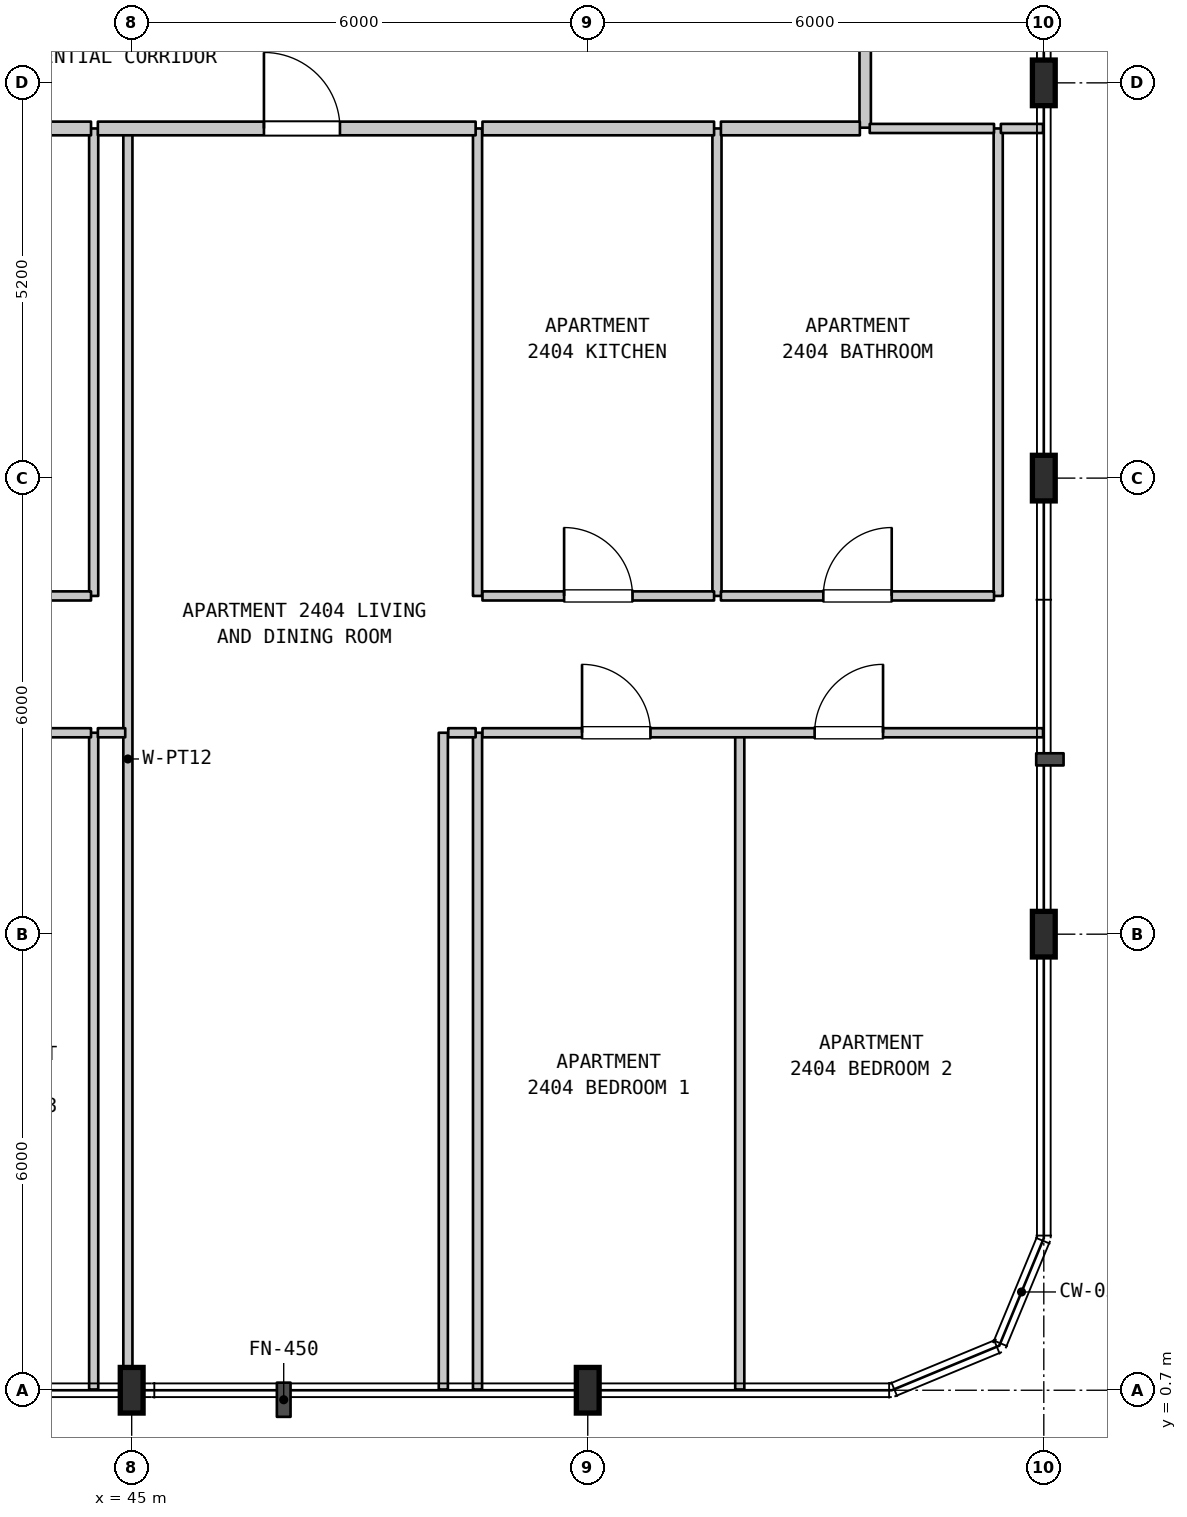
"""IFC4 building model, lengths in metres.
Left out: names, types, materials, properties, quantities, classifications, styles, units other than length and angle.
Written with IfcOpenShell. Run it as: python <this file> out.ifc"""

import sys

from ifc_helpers import new_model, si_unit, direction, frame, frame_2d, origin, origin_2d, place, context, subcontext, project, spatial, rectangle, i_section, extrude, element, fill, save


model = new_model("IFC4")
c1 = context("Model", 3, precision=1e-05, world=origin(), true_north=direction((0.0, 1.0)))
c2 = subcontext(c1, "Body", "Model", "MODEL_VIEW")
j1 = project(units=[si_unit("LENGTHUNIT", "METRE"), si_unit("PLANEANGLEUNIT", "RADIAN")], contexts=[c1])
p1 = place(None, origin())
s1 = spatial("IfcSite", under=j1, at=p1, CompositionType="ELEMENT")
p2 = place(p1, origin())
s2 = spatial("IfcBuilding", under=s1, at=p2, CompositionType="ELEMENT")
p3 = place(p2, frame((0.0, 0.0, 102.0)))
s3 = spatial("IfcBuildingStorey", under=s2, at=p3, CompositionType="ELEMENT", Elevation=102.0)
for number, where, z_axis, x_axis in (
    (1, (45.0, 0.7, 0.0), (0.0, 0.0, 1.0), (1.0, 0.0, 0.0)),
    (2, (51.0, 0.7, 0.0), (0.0, 0.0, 1.0), (1.0, 0.0, 0.0)),
    (3, (57.0, 6.7, 0.0), (0.0, 0.0, 1.0), (1.0, 0.0, 0.0)),
    (4, (57.0, 12.7, 0.0), (0.0, 0.0, 1.0), (1.0, 0.0, 0.0)),
    (5, (57.0, 17.9, 0.0), (0.0, 0.0, 1.0), (1.0, 0.0, 0.0)),
):
    element("IfcColumn", number, at=place(p3, frame(where, z_axis=z_axis, x_axis=x_axis)), inside=s3, PredefinedType="COLUMN", context=c2, shape_type="SweptSolid", body=[
        extrude(i_section(OverallWidth=0.3, OverallDepth=0.6, WebThickness=0.015, FlangeThickness=0.03, FilletRadius=0.027, at=origin_2d()), origin(), (0.0, 0.0, 1.0), 3.7),
    ])
p4 = place(p3, frame((44.5, 0.71, 0.0), z_axis=(0.0, 0.0, 1.0), x_axis=(0.0, 1.0, 0.0)))
e6 = element("IfcWall", 6, at=p4, inside=s3, PredefinedType="PARTITIONING", context=c2, shape_type="SweptSolid", body=[
    extrude(rectangle(XDim=8.64, YDim=0.12, at=frame_2d((4.32, 0.0))), origin(), (0.0, 0.0, 1.0), 3.385),
])
p5 = place(p3, frame((44.5, 11.15, 0.0), z_axis=(0.0, 0.0, 1.0), x_axis=(0.0, 1.0, 0.0)))
e7 = element("IfcWall", 7, at=p5, inside=s3, PredefinedType="PARTITIONING", context=c2, shape_type="SweptSolid", body=[
    extrude(rectangle(XDim=6.15, YDim=0.12, at=frame_2d((3.075, 0.0))), origin(), (0.0, 0.0, 1.0), 3.385),
])
p6 = place(p3, frame((44.95, 0.71, 0.0), z_axis=(0.0, 0.0, 1.0), x_axis=(0.0, 1.0, 0.0)))
e8 = element("IfcWall", 8, at=p6, inside=s3, PredefinedType="PARTITIONING", context=c2, shape_type="SweptSolid", body=[
    extrude(rectangle(XDim=16.59, YDim=0.12, at=frame_2d((8.295, 0.0))), origin(), (0.0, 0.0, 1.0), 3.385),
])
for number, where, z_axis, x_axis in (
    (9, (49.1, 0.71, 0.0), (0.0, 0.0, 1.0), (0.0, 1.0, 0.0)),
    (10, (49.55, 0.71, 0.0), (0.0, 0.0, 1.0), (0.0, 1.0, 0.0)),
):
    element("IfcWall", number, at=place(p3, frame(where, z_axis=z_axis, x_axis=x_axis)), inside=s3, PredefinedType="PARTITIONING", context=c2, shape_type="SweptSolid", body=[
        extrude(rectangle(XDim=8.64, YDim=0.12, at=frame_2d((4.32, 0.0))), origin(), (0.0, 0.0, 1.0), 3.385),
    ])
for number, where, z_axis, x_axis in (
    (11, (49.55, 11.15, 0.0), (0.0, 0.0, 1.0), (0.0, 1.0, 0.0)),
    (12, (52.7, 11.15, 0.0), (0.0, 0.0, 1.0), (0.0, 1.0, 0.0)),
):
    element("IfcWall", number, at=place(p3, frame(where, z_axis=z_axis, x_axis=x_axis)), inside=s3, PredefinedType="PARTITIONING", context=c2, shape_type="SweptSolid", body=[
        extrude(rectangle(XDim=6.15, YDim=0.12, at=frame_2d((3.075, 0.0))), origin(), (0.0, 0.0, 1.0), 3.385),
    ])
p7 = place(p3, frame((53.0, 0.71, 0.0), z_axis=(0.0, 0.0, 1.0), x_axis=(0.0, 1.0, 0.0)))
e13 = element("IfcWall", 13, at=p7, inside=s3, PredefinedType="PARTITIONING", context=c2, shape_type="SweptSolid", body=[
    extrude(rectangle(XDim=8.64, YDim=0.12, at=frame_2d((4.32, 0.0))), origin(), (0.0, 0.0, 1.0), 3.385),
])
p8 = place(p3, frame((54.65, 17.31, 0.0), z_axis=(0.0, 0.0, 1.0), x_axis=(0.0, 1.0, 0.0)))
e14 = element("IfcWall", 14, at=p8, inside=s3, PredefinedType="STANDARD", context=c2, shape_type="SweptSolid", body=[
    extrude(rectangle(XDim=2.19, YDim=0.15, at=frame_2d((1.095, 0.0))), origin(), (0.0, 0.0, 1.0), 3.385),
])
p9 = place(p3, frame((56.4, 11.15, 0.0), z_axis=(0.0, 0.0, 1.0), x_axis=(0.0, 1.0, 0.0)))
e15 = element("IfcWall", 15, at=p9, inside=s3, PredefinedType="PARTITIONING", context=c2, shape_type="SweptSolid", body=[
    extrude(rectangle(XDim=6.15, YDim=0.12, at=frame_2d((3.075, 0.0))), origin(), (0.0, 0.0, 1.0), 3.385),
])
p10 = place(p3, frame((37.425, 9.35, 0.0), z_axis=(0.0, 0.0, 1.0), x_axis=(1.0, 0.0, 0.0)))
e16 = element("IfcWall", 16, at=p10, inside=s3, PredefinedType="PARTITIONING", context=c2, shape_type="SweptSolid", body=[
    extrude(rectangle(XDim=7.04, YDim=0.12, at=frame_2d((3.52, 0.0))), origin(), (0.0, 0.0, 1.0), 3.385),
])
p11 = place(p10, frame((0.868, 0.0, 0.0)))
e17 = element("IfcOpeningElement", 17, at=p11, cuts=e16, PredefinedType="OPENING", context=c2, shape_type="SweptSolid", body=[
    extrude(rectangle(XDim=0.9, YDim=2.15, at=frame_2d((0.45, 1.075))), frame((0.0, 0.07, 0.0), z_axis=(0.0, -1.0, 0.0), x_axis=(1.0, 0.0, 0.0)), (0.0, 0.0, 1.0), 0.14),
])
p12 = place(p10, frame((2.999, 0.0, 0.0)))
e18 = element("IfcOpeningElement", 18, at=p12, cuts=e16, PredefinedType="OPENING", context=c2, shape_type="SweptSolid", body=[
    extrude(rectangle(XDim=0.9, YDim=2.15, at=frame_2d((0.45, 1.075))), frame((0.0, 0.07, 0.0), z_axis=(0.0, -1.0, 0.0), x_axis=(1.0, 0.0, 0.0)), (0.0, 0.0, 1.0), 0.14),
])
p13 = place(p10, frame((5.272, 0.0, 0.0)))
e19 = element("IfcOpeningElement", 19, at=p13, cuts=e16, PredefinedType="OPENING", context=c2, shape_type="SweptSolid", body=[
    extrude(rectangle(XDim=0.9, YDim=2.15, at=frame_2d((0.45, 1.075))), frame((0.0, 0.07, 0.0), z_axis=(0.0, -1.0, 0.0), x_axis=(1.0, 0.0, 0.0)), (0.0, 0.0, 1.0), 0.14),
])
p14 = place(p3, frame((44.555, 9.35, 0.0), z_axis=(0.0, 0.0, 1.0), x_axis=(1.0, 0.0, 0.0)))
e20 = element("IfcWall", 20, at=p14, inside=s3, PredefinedType="PARTITIONING", context=c2, shape_type="SweptSolid", body=[
    extrude(rectangle(XDim=0.36, YDim=0.12, at=frame_2d((0.18, 0.0))), origin(), (0.0, 0.0, 1.0), 3.385),
])
p15 = place(p3, frame((49.165, 9.35, 0.0), z_axis=(0.0, 0.0, 1.0), x_axis=(1.0, 0.0, 0.0)))
e21 = element("IfcWall", 21, at=p15, inside=s3, PredefinedType="PARTITIONING", context=c2, shape_type="SweptSolid", body=[
    extrude(rectangle(XDim=0.36, YDim=0.12, at=frame_2d((0.18, 0.0))), origin(), (0.0, 0.0, 1.0), 3.385),
])
p16 = place(p3, frame((49.615, 9.35, 0.0), z_axis=(0.0, 0.0, 1.0), x_axis=(1.0, 0.0, 0.0)))
e22 = element("IfcWall", 22, at=p16, inside=s3, PredefinedType="PARTITIONING", context=c2, shape_type="SweptSolid", body=[
    extrude(rectangle(XDim=7.375, YDim=0.12, at=frame_2d((3.688, 0.0))), origin(), (0.0, 0.0, 1.0), 3.385),
])
p17 = place(p16, frame((1.31, 0.0, 0.0)))
e23 = element("IfcOpeningElement", 23, at=p17, cuts=e22, PredefinedType="OPENING", context=c2, shape_type="SweptSolid", body=[
    extrude(rectangle(XDim=0.9, YDim=2.15, at=frame_2d((0.45, 1.075))), frame((0.0, 0.07, 0.0), z_axis=(0.0, -1.0, 0.0), x_axis=(1.0, 0.0, 0.0)), (0.0, 0.0, 1.0), 0.14),
])
p18 = place(p16, frame((4.37, 0.0, 0.0)))
e24 = element("IfcOpeningElement", 24, at=p18, cuts=e22, PredefinedType="OPENING", context=c2, shape_type="SweptSolid", body=[
    extrude(rectangle(XDim=0.9, YDim=2.15, at=frame_2d((0.45, 1.075))), frame((0.0, 0.07, 0.0), z_axis=(0.0, -1.0, 0.0), x_axis=(1.0, 0.0, 0.0)), (0.0, 0.0, 1.0), 0.14),
])
p19 = place(p3, frame((40.705, 11.15, 0.0), z_axis=(0.0, 0.0, 1.0), x_axis=(1.0, 0.0, 0.0)))
e25 = element("IfcWall", 25, at=p19, inside=s3, PredefinedType="PARTITIONING", context=c2, shape_type="SweptSolid", body=[
    extrude(rectangle(XDim=3.76, YDim=0.12, at=frame_2d((1.88, 0.0))), origin(), (0.0, 0.0, 1.0), 3.385),
])
p20 = place(p19, frame((1.358, 0.0, 0.0)))
e26 = element("IfcOpeningElement", 26, at=p20, cuts=e25, PredefinedType="OPENING", context=c2, shape_type="SweptSolid", body=[
    extrude(rectangle(XDim=0.9, YDim=2.1, at=frame_2d((0.45, 1.05))), frame((0.0, 0.07, 0.0), z_axis=(0.0, -1.0, 0.0), x_axis=(1.0, 0.0, 0.0)), (0.0, 0.0, 1.0), 0.14),
])
p21 = place(p3, frame((49.615, 11.15, 0.0), z_axis=(0.0, 0.0, 1.0), x_axis=(1.0, 0.0, 0.0)))
e27 = element("IfcWall", 27, at=p21, inside=s3, PredefinedType="PARTITIONING", context=c2, shape_type="SweptSolid", body=[
    extrude(rectangle(XDim=3.047, YDim=0.12, at=frame_2d((1.523, 0.0))), origin(), (0.0, 0.0, 1.0), 3.385),
])
p22 = place(p21, frame((1.074, 0.0, 0.0)))
e28 = element("IfcOpeningElement", 28, at=p22, cuts=e27, PredefinedType="OPENING", context=c2, shape_type="SweptSolid", body=[
    extrude(rectangle(XDim=0.9, YDim=2.15, at=frame_2d((0.45, 1.075))), frame((0.0, 0.07, 0.0), z_axis=(0.0, -1.0, 0.0), x_axis=(1.0, 0.0, 0.0)), (0.0, 0.0, 1.0), 0.14),
])
p23 = place(p3, frame((52.752, 11.15, 0.0), z_axis=(0.0, 0.0, 1.0), x_axis=(1.0, 0.0, 0.0)))
e29 = element("IfcWall", 29, at=p23, inside=s3, PredefinedType="PARTITIONING", context=c2, shape_type="SweptSolid", body=[
    extrude(rectangle(XDim=3.593, YDim=0.12, at=frame_2d((1.796, 0.0))), origin(), (0.0, 0.0, 1.0), 3.385),
])
p24 = place(p23, frame((1.347, 0.0, 0.0)))
e30 = element("IfcOpeningElement", 30, at=p24, cuts=e29, PredefinedType="OPENING", context=c2, shape_type="SweptSolid", body=[
    extrude(rectangle(XDim=0.9, YDim=2.1, at=frame_2d((0.45, 1.05))), frame((0.0, 0.07, 0.0), z_axis=(0.0, -1.0, 0.0), x_axis=(1.0, 0.0, 0.0)), (0.0, 0.0, 1.0), 0.14),
])
p25 = place(p3, frame((40.705, 17.3, 0.0), z_axis=(0.0, 0.0, 1.0), x_axis=(1.0, 0.0, 0.0)))
e31 = element("IfcWall", 31, at=p25, inside=s3, PredefinedType="STANDARD", context=c2, shape_type="SweptSolid", body=[
    extrude(rectangle(XDim=3.76, YDim=0.18, at=frame_2d((1.88, 0.0))), origin(), (0.0, 0.0, 1.0), 3.385),
])
p26 = place(p3, frame((44.555, 17.3, 0.0), z_axis=(0.0, 0.0, 1.0), x_axis=(1.0, 0.0, 0.0)))
e32 = element("IfcWall", 32, at=p26, inside=s3, PredefinedType="STANDARD", context=c2, shape_type="SweptSolid", body=[
    extrude(rectangle(XDim=4.97, YDim=0.18, at=frame_2d((2.485, 0.0))), origin(), (0.0, 0.0, 1.0), 3.385),
])
p27 = place(p26, frame((2.185, 0.0, 0.0)))
e33 = element("IfcOpeningElement", 33, at=p27, cuts=e32, PredefinedType="OPENING", context=c2, shape_type="SweptSolid", body=[
    extrude(rectangle(XDim=1.0, YDim=2.15, at=frame_2d((0.5, 1.075))), frame((0.0, 0.1, 0.0), z_axis=(0.0, -1.0, 0.0), x_axis=(1.0, 0.0, 0.0)), (0.0, 0.0, 1.0), 0.2),
])
p28 = place(p3, frame((49.615, 17.3, 0.0), z_axis=(0.0, 0.0, 1.0), x_axis=(1.0, 0.0, 0.0)))
e34 = element("IfcWall", 34, at=p28, inside=s3, PredefinedType="STANDARD", context=c2, shape_type="SweptSolid", body=[
    extrude(rectangle(XDim=3.047, YDim=0.18, at=frame_2d((1.523, 0.0))), origin(), (0.0, 0.0, 1.0), 3.385),
])
p29 = place(p3, frame((52.752, 17.3, 0.0), z_axis=(0.0, 0.0, 1.0), x_axis=(1.0, 0.0, 0.0)))
e35 = element("IfcWall", 35, at=p29, inside=s3, PredefinedType="STANDARD", context=c2, shape_type="SweptSolid", body=[
    extrude(rectangle(XDim=1.828, YDim=0.18, at=frame_2d((0.914, 0.0))), origin(), (0.0, 0.0, 1.0), 3.385),
])
p30 = place(p3, frame((54.71, 17.3, 0.0), z_axis=(0.0, 0.0, 1.0), x_axis=(1.0, 0.0, 0.0)))
e36 = element("IfcWall", 36, at=p30, inside=s3, PredefinedType="PARTITIONING", context=c2, shape_type="SweptSolid", body=[
    extrude(rectangle(XDim=1.635, YDim=0.12, at=frame_2d((0.817, 0.0))), origin(), (0.0, 0.0, 1.0), 3.385),
])
p31 = place(p3, frame((56.435, 17.3, 0.0), z_axis=(0.0, 0.0, 1.0), x_axis=(1.0, 0.0, 0.0)))
e37 = element("IfcWall", 37, at=p31, inside=s3, PredefinedType="PARTITIONING", context=c2, shape_type="SweptSolid", body=[
    extrude(rectangle(XDim=0.555, YDim=0.12, at=frame_2d((0.277, 0.0))), origin(), (0.0, 0.0, 1.0), 3.385),
])
p32 = place(p17, origin())
e38 = element("IfcDoor", 38, at=p32, inside=s3, OperationType="SINGLE_SWING_LEFT", PredefinedType="DOOR", context=c2, shape_type="SweptSolid", body=[
    extrude(rectangle(XDim=0.9, YDim=2.15, at=frame_2d((0.45, 1.075))), frame((0.0, 0.025, 0.0), z_axis=(0.0, -1.0, 0.0), x_axis=(1.0, 0.0, 0.0)), (0.0, 0.0, 1.0), 0.05),
])
fill(e23, e38)
p33 = place(p18, origin())
e39 = element("IfcDoor", 39, at=p33, inside=s3, OperationType="SINGLE_SWING_RIGHT", PredefinedType="DOOR", context=c2, shape_type="SweptSolid", body=[
    extrude(rectangle(XDim=0.9, YDim=2.15, at=frame_2d((0.45, 1.075))), frame((0.0, 0.025, 0.0), z_axis=(0.0, -1.0, 0.0), x_axis=(1.0, 0.0, 0.0)), (0.0, 0.0, 1.0), 0.05),
])
fill(e24, e39)
p34 = place(p22, origin())
e40 = element("IfcDoor", 40, at=p34, inside=s3, OperationType="SINGLE_SWING_LEFT", PredefinedType="DOOR", context=c2, shape_type="SweptSolid", body=[
    extrude(rectangle(XDim=0.9, YDim=2.15, at=frame_2d((0.45, 1.075))), frame((0.0, 0.025, 0.0), z_axis=(0.0, -1.0, 0.0), x_axis=(1.0, 0.0, 0.0)), (0.0, 0.0, 1.0), 0.05),
])
fill(e28, e40)
p35 = place(p24, origin())
e41 = element("IfcDoor", 41, at=p35, inside=s3, OperationType="SINGLE_SWING_RIGHT", PredefinedType="DOOR", context=c2, shape_type="SweptSolid", body=[
    extrude(rectangle(XDim=0.9, YDim=2.1, at=frame_2d((0.45, 1.05))), frame((0.0, 0.025, 0.0), z_axis=(0.0, -1.0, 0.0), x_axis=(1.0, 0.0, 0.0)), (0.0, 0.0, 1.0), 0.05),
])
fill(e30, e41)
p36 = place(p27, origin())
e42 = element("IfcDoor", 42, at=p36, inside=s3, OperationType="SINGLE_SWING_LEFT", PredefinedType="DOOR", context=c2, shape_type="SweptSolid", body=[
    extrude(rectangle(XDim=1.0, YDim=2.15, at=frame_2d((0.5, 1.075))), frame((0.0, 0.025, 0.0), z_axis=(0.0, -1.0, 0.0), x_axis=(1.0, 0.0, 0.0)), (0.0, 0.0, 1.0), 0.05),
])
fill(e33, e42)
save(model, sys.argv[1])
